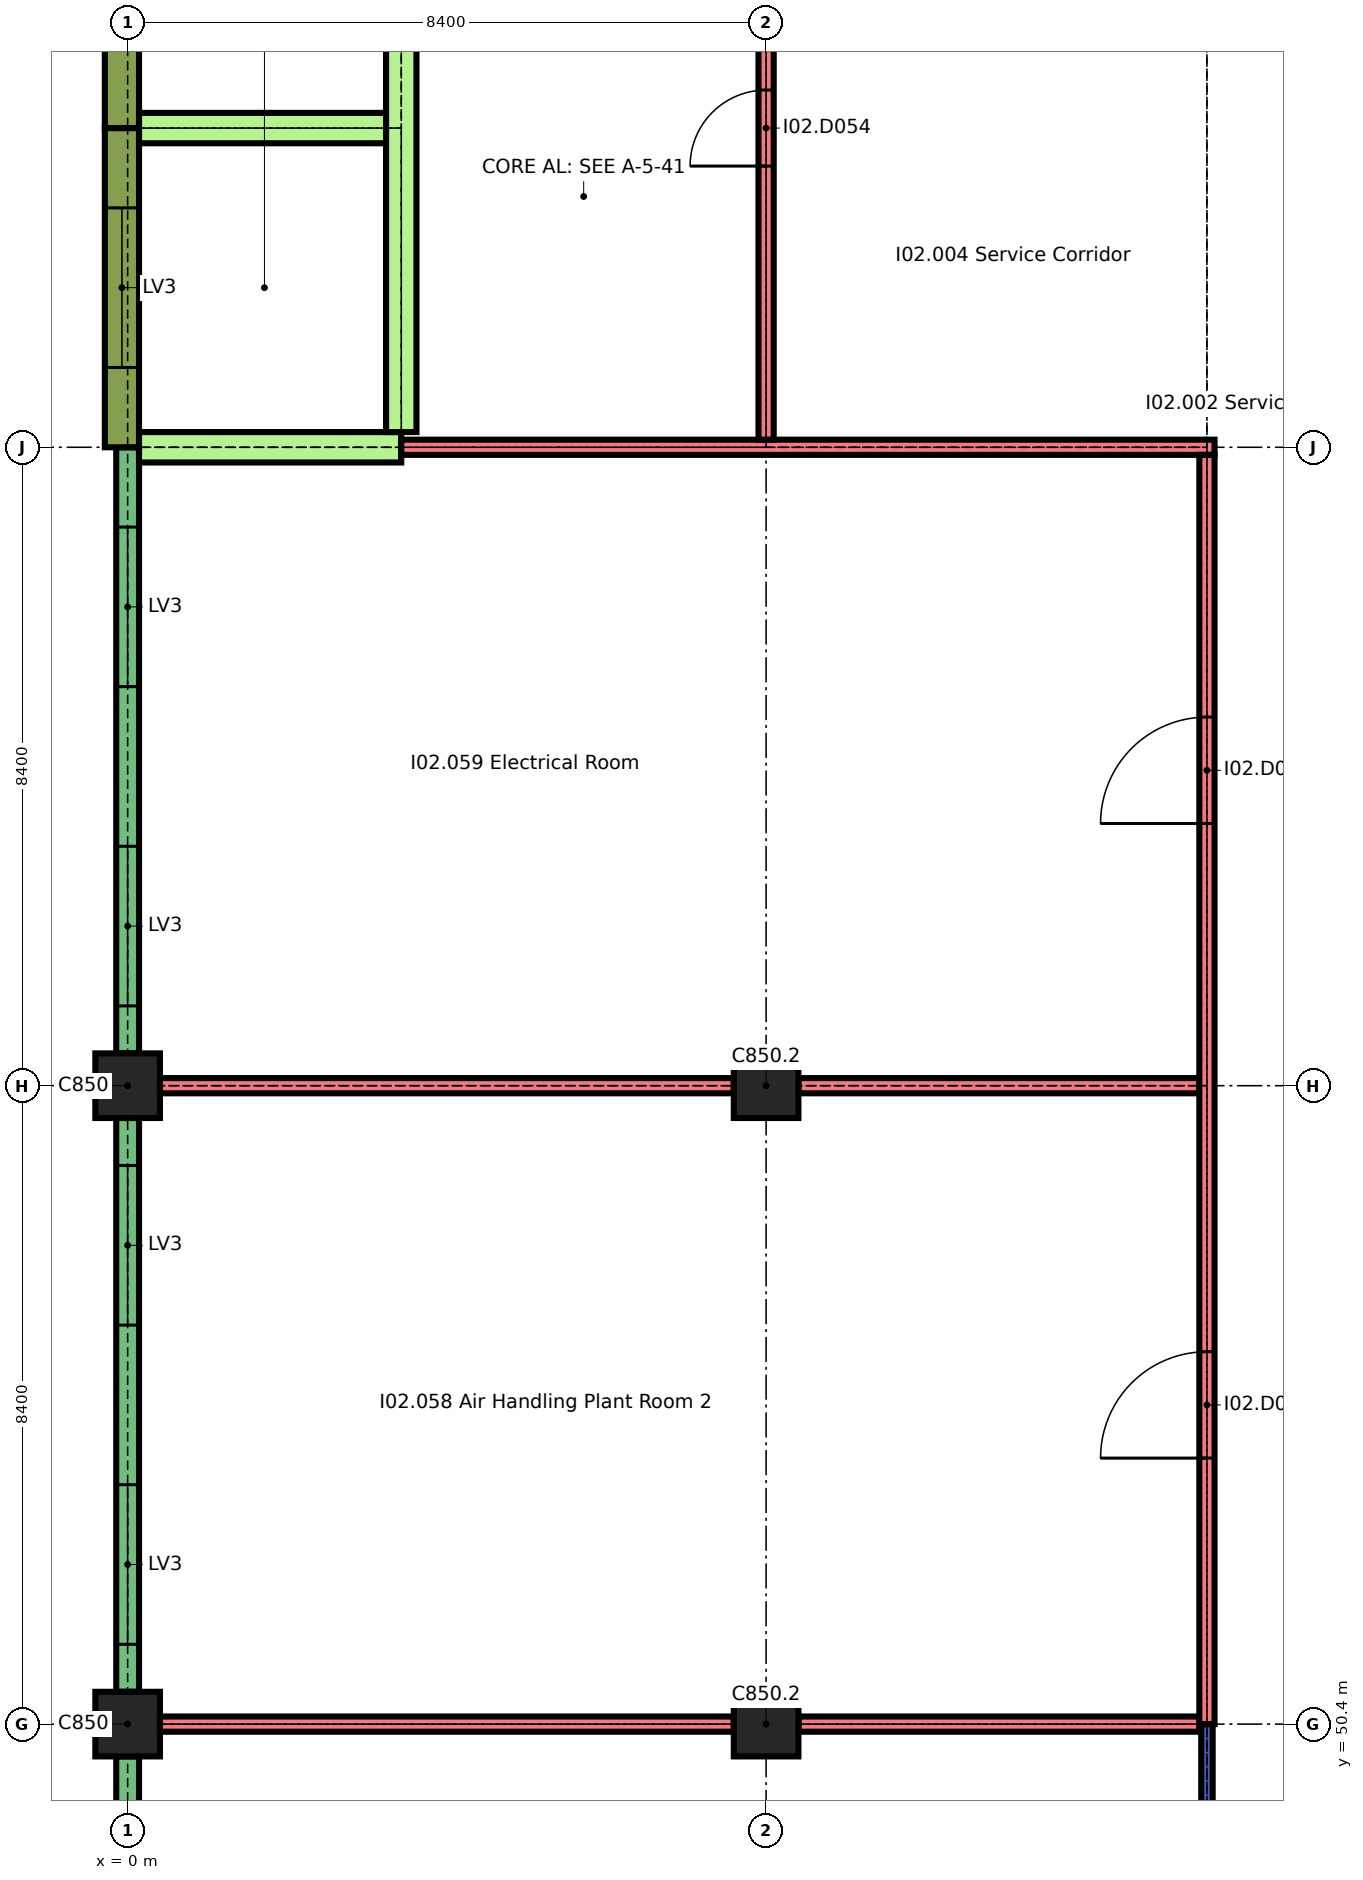
"""IFC4 building model, lengths in metres.
Left out: names, types, materials, properties, quantities, classifications, styles, units other than length and angle.
Written with IfcOpenShell. Run it as: python <this file> out.ifc"""

import sys

from ifc_helpers import new_model, si_unit, direction, frame, frame_2d, origin, origin_2d, place, context, subcontext, project, spatial, rectangle, extrude, element, fill, save


model = new_model("IFC4")
c1 = context("Model", 3, precision=1e-05, world=origin(), true_north=direction((0.0, 1.0)))
c2 = subcontext(c1, "Body", "Model", "MODEL_VIEW")
j1 = project(units=[si_unit("LENGTHUNIT", "METRE"), si_unit("PLANEANGLEUNIT", "RADIAN")], contexts=[c1])
p1 = place(None, origin())
s1 = spatial("IfcSite", under=j1, at=p1, CompositionType="ELEMENT")
p2 = place(p1, origin())
s2 = spatial("IfcBuilding", under=s1, at=p2, CompositionType="ELEMENT")
p3 = place(p2, frame((0.0, 0.0, 12.9)))
s3 = spatial("IfcBuildingStorey", under=s2, at=p3, CompositionType="ELEMENT", Elevation=12.9)
for number, where, z_axis, x_axis in (
    (1, (0.0, 50.4, 0.0), (0.0, 0.0, 1.0), (1.0, 0.0, 0.0)),
    (2, (8.4, 50.4, 0.0), (0.0, 0.0, 1.0), (1.0, 0.0, 0.0)),
    (3, (0.0, 58.8, 0.0), (0.0, 0.0, 1.0), (1.0, 0.0, 0.0)),
    (4, (8.4, 58.8, 0.0), (0.0, 0.0, 1.0), (1.0, 0.0, 0.0)),
):
    element("IfcColumn", number, at=place(p3, frame(where, z_axis=z_axis, x_axis=x_axis)), inside=s3, PredefinedType="COLUMN", context=c2, shape_type="SweptSolid", body=[
        extrude(rectangle(XDim=0.85, YDim=0.85, at=origin_2d()), origin(), (0.0, 0.0, 1.0), 2.04),
    ])
p4 = place(p3, frame((0.0, 42.425, 0.0), z_axis=(0.0, 0.0, 1.0), x_axis=(0.0, 1.0, 0.0)))
e5 = element("IfcWall", 5, at=p4, inside=s3, PredefinedType="SOLIDWALL", context=c2, shape_type="SweptSolid", body=[
    extrude(rectangle(XDim=7.55, YDim=0.3, at=frame_2d((3.775, 0.0))), origin(), (0.0, 0.0, 1.0), 1.74),
])
p5 = place(p4, frame((0.625, 0.0, 0.6)))
e6 = element("IfcOpeningElement", 6, at=p5, cuts=e5, PredefinedType="OPENING", context=c2, shape_type="SweptSolid", body=[
    extrude(rectangle(XDim=2.1, YDim=1.05, at=frame_2d((1.05, 0.525))), frame((0.0, 0.16, 0.0), z_axis=(0.0, -1.0, 0.0), x_axis=(1.0, 0.0, 0.0)), (0.0, 0.0, 1.0), 0.32),
])
p6 = place(p4, frame((4.825, 0.0, 0.6)))
e7 = element("IfcOpeningElement", 7, at=p6, cuts=e5, PredefinedType="OPENING", context=c2, shape_type="SweptSolid", body=[
    extrude(rectangle(XDim=2.1, YDim=1.05, at=frame_2d((1.05, 0.525))), frame((0.0, 0.16, 0.0), z_axis=(0.0, -1.0, 0.0), x_axis=(1.0, 0.0, 0.0)), (0.0, 0.0, 1.0), 0.32),
])
p7 = place(p3, frame((0.0, 50.825, 0.0), z_axis=(0.0, 0.0, 1.0), x_axis=(0.0, 1.0, 0.0)))
e8 = element("IfcWall", 8, at=p7, inside=s3, PredefinedType="SOLIDWALL", context=c2, shape_type="SweptSolid", body=[
    extrude(rectangle(XDim=7.55, YDim=0.3, at=frame_2d((3.775, 0.0))), origin(), (0.0, 0.0, 1.0), 1.74),
])
p8 = place(p7, frame((0.625, 0.0, 0.6)))
e9 = element("IfcOpeningElement", 9, at=p8, cuts=e8, PredefinedType="OPENING", context=c2, shape_type="SweptSolid", body=[
    extrude(rectangle(XDim=2.1, YDim=1.05, at=frame_2d((1.05, 0.525))), frame((0.0, 0.16, 0.0), z_axis=(0.0, -1.0, 0.0), x_axis=(1.0, 0.0, 0.0)), (0.0, 0.0, 1.0), 0.32),
])
p9 = place(p7, frame((4.825, 0.0, 0.6)))
e10 = element("IfcOpeningElement", 10, at=p9, cuts=e8, PredefinedType="OPENING", context=c2, shape_type="SweptSolid", body=[
    extrude(rectangle(XDim=2.1, YDim=1.05, at=frame_2d((1.05, 0.525))), frame((0.0, 0.16, 0.0), z_axis=(0.0, -1.0, 0.0), x_axis=(1.0, 0.0, 0.0)), (0.0, 0.0, 1.0), 0.32),
])
p10 = place(p3, frame((0.0, 59.225, 0.0), z_axis=(0.0, 0.0, 1.0), x_axis=(0.0, 1.0, 0.0)))
e11 = element("IfcWall", 11, at=p10, inside=s3, PredefinedType="SOLIDWALL", context=c2, shape_type="SweptSolid", body=[
    extrude(rectangle(XDim=7.975, YDim=0.3, at=frame_2d((3.987, 0.0))), origin(), (0.0, 0.0, 1.0), 1.74),
])
p11 = place(p10, frame((0.625, 0.0, 0.6)))
e12 = element("IfcOpeningElement", 12, at=p11, cuts=e11, PredefinedType="OPENING", context=c2, shape_type="SweptSolid", body=[
    extrude(rectangle(XDim=2.1, YDim=1.05, at=frame_2d((1.05, 0.525))), frame((0.0, 0.16, 0.0), z_axis=(0.0, -1.0, 0.0), x_axis=(1.0, 0.0, 0.0)), (0.0, 0.0, 1.0), 0.32),
])
p12 = place(p10, frame((4.825, 0.0, 0.6)))
e13 = element("IfcOpeningElement", 13, at=p12, cuts=e11, PredefinedType="OPENING", context=c2, shape_type="SweptSolid", body=[
    extrude(rectangle(XDim=2.1, YDim=1.05, at=frame_2d((1.05, 0.525))), frame((0.0, 0.16, 0.0), z_axis=(0.0, -1.0, 0.0), x_axis=(1.0, 0.0, 0.0)), (0.0, 0.0, 1.0), 0.32),
])
p13 = place(p3, frame((-0.075, 67.2, 0.0), z_axis=(0.0, 0.0, 1.0), x_axis=(0.0, 1.0, 0.0)))
e14 = element("IfcWall", 14, at=p13, inside=s3, PredefinedType="SOLIDWALL", context=c2, shape_type="SweptSolid", body=[
    extrude(rectangle(XDim=4.2, YDim=0.45, at=frame_2d((2.1, 0.0))), origin(), (0.0, 0.0, 1.0), 2.04),
])
p14 = place(p13, frame((1.05, 0.0, 0.6)))
e15 = element("IfcOpeningElement", 15, at=p14, cuts=e14, PredefinedType="OPENING", context=c2, shape_type="SweptSolid", body=[
    extrude(rectangle(XDim=2.1, YDim=1.05, at=frame_2d((1.05, 0.525))), frame((0.0, 0.235, 0.0), z_axis=(0.0, -1.0, 0.0), x_axis=(1.0, 0.0, 0.0)), (0.0, 0.0, 1.0), 0.47),
])
p15 = place(p3, frame((-0.075, 71.4, 0.0), z_axis=(0.0, 0.0, 1.0), x_axis=(0.0, 1.0, 0.0)))
e16 = element("IfcWall", 16, at=p15, inside=s3, PredefinedType="SOLIDWALL", context=c2, shape_type="SweptSolid", body=[
    extrude(rectangle(XDim=4.2, YDim=0.45, at=frame_2d((2.1, 0.0))), origin(), (0.0, 0.0, 1.0), 2.04),
])
p16 = place(p15, frame((1.05, 0.0, 0.6)))
e17 = element("IfcOpeningElement", 17, at=p16, cuts=e16, PredefinedType="OPENING", context=c2, shape_type="SweptSolid", body=[
    extrude(rectangle(XDim=2.1, YDim=1.05, at=frame_2d((1.05, 0.525))), frame((0.0, 0.235, 0.0), z_axis=(0.0, -1.0, 0.0), x_axis=(1.0, 0.0, 0.0)), (0.0, 0.0, 1.0), 0.47),
])
p17 = place(p3, frame((0.425, 50.4, 0.0), z_axis=(0.0, 0.0, 1.0), x_axis=(1.0, 0.0, 0.0)))
e18 = element("IfcWall", 18, at=p17, inside=s3, PredefinedType="SOLIDWALL", context=c2, shape_type="SweptSolid", body=[
    extrude(rectangle(XDim=7.55, YDim=0.2, at=frame_2d((3.775, 0.0))), origin(), (0.0, 0.0, 1.0), 2.04),
])
p18 = place(p3, frame((8.825, 50.4, 0.0), z_axis=(0.0, 0.0, 1.0), x_axis=(1.0, 0.0, 0.0)))
e19 = element("IfcWall", 19, at=p18, inside=s3, PredefinedType="SOLIDWALL", context=c2, shape_type="SweptSolid", body=[
    extrude(rectangle(XDim=5.275, YDim=0.2, at=frame_2d((2.638, 0.0))), origin(), (0.0, 0.0, 1.0), 2.04),
])
p19 = place(p3, frame((0.425, 58.8, 0.0), z_axis=(0.0, 0.0, 1.0), x_axis=(1.0, 0.0, 0.0)))
e20 = element("IfcWall", 20, at=p19, inside=s3, PredefinedType="SOLIDWALL", context=c2, shape_type="SweptSolid", body=[
    extrude(rectangle(XDim=7.55, YDim=0.2, at=frame_2d((3.775, 0.0))), origin(), (0.0, 0.0, 1.0), 2.04),
])
p20 = place(p3, frame((8.825, 58.8, 0.0), z_axis=(0.0, 0.0, 1.0), x_axis=(1.0, 0.0, 0.0)))
e21 = element("IfcWall", 21, at=p20, inside=s3, PredefinedType="SOLIDWALL", context=c2, shape_type="SweptSolid", body=[
    extrude(rectangle(XDim=5.275, YDim=0.2, at=frame_2d((2.638, 0.0))), origin(), (0.0, 0.0, 1.0), 2.04),
])
p21 = place(p3, frame((0.15, 67.2, 0.0), z_axis=(0.0, 0.0, 1.0), x_axis=(1.0, 0.0, 0.0)))
e22 = element("IfcWall", 22, at=p21, inside=s3, PredefinedType="SHEAR", context=c2, shape_type="SweptSolid", body=[
    extrude(rectangle(XDim=3.45, YDim=0.4, at=frame_2d((1.725, 0.0))), origin(), (0.0, 0.0, 1.0), 2.04),
])
p22 = place(p3, frame((3.6, 67.2, 0.0), z_axis=(0.0, 0.0, 1.0), x_axis=(1.0, 0.0, 0.0)))
e23 = element("IfcWall", 23, at=p22, inside=s3, PredefinedType="SOLIDWALL", context=c2, shape_type="SweptSolid", body=[
    extrude(rectangle(XDim=10.7, YDim=0.2, at=frame_2d((5.35, 0.0))), origin(), (0.0, 0.0, 1.0), 2.04),
])
p23 = place(p3, frame((0.15, 71.4, 0.0), z_axis=(0.0, 0.0, 1.0), x_axis=(1.0, 0.0, 0.0)))
e24 = element("IfcWall", 24, at=p23, inside=s3, PredefinedType="SHEAR", context=c2, shape_type="SweptSolid", body=[
    extrude(rectangle(XDim=3.25, YDim=0.4, at=frame_2d((1.625, 0.0))), origin(), (0.0, 0.0, 1.0), 2.04),
])
p24 = place(p3, frame((3.6, 67.4, 0.0), z_axis=(0.0, 0.0, 1.0), x_axis=(0.0, 1.0, 0.0)))
e25 = element("IfcWall", 25, at=p24, inside=s3, PredefinedType="SHEAR", context=c2, shape_type="SweptSolid", body=[
    extrude(rectangle(XDim=8.0, YDim=0.4, at=frame_2d((4.0, 0.0))), origin(), (0.0, 0.0, 1.0), 2.04),
])
p25 = place(p3, frame((8.4, 67.3, 0.0), z_axis=(0.0, 0.0, 1.0), x_axis=(0.0, 1.0, 0.0)))
e26 = element("IfcWall", 26, at=p25, inside=s3, PredefinedType="SOLIDWALL", context=c2, shape_type="SweptSolid", body=[
    extrude(rectangle(XDim=8.2, YDim=0.2, at=frame_2d((4.1, 0.0))), origin(), (0.0, 0.0, 1.0), 2.04),
])
p26 = place(p25, frame((3.6, 0.0, 0.0)))
e27 = element("IfcOpeningElement", 27, at=p26, cuts=e26, PredefinedType="OPENING", context=c2, shape_type="SweptSolid", body=[
    extrude(rectangle(XDim=1.0, YDim=2.0, at=frame_2d((0.5, 1.0))), frame((0.0, 0.11, 0.0), z_axis=(0.0, -1.0, 0.0), x_axis=(1.0, 0.0, 0.0)), (0.0, 0.0, 1.0), 0.22),
])
p27 = place(p3, frame((14.2, 33.6, 0.0), z_axis=(0.0, 0.0, 1.0), x_axis=(0.0, 1.0, 0.0)))
e28 = element("IfcWall", 28, at=p27, inside=s3, PredefinedType="PARTITIONING", context=c2, shape_type="SweptSolid", body=[
    extrude(rectangle(XDim=16.8, YDim=0.15, at=frame_2d((8.4, 0.0))), origin(), (0.0, 0.0, 1.0), 2.04),
])
p28 = place(p27, frame((7.7, 0.0, 0.0)))
e29 = element("IfcOpeningElement", 29, at=p28, cuts=e28, PredefinedType="OPENING", context=c2, shape_type="SweptSolid", body=[
    extrude(rectangle(XDim=1.4, YDim=2.0, at=frame_2d((0.7, 1.0))), frame((0.0, 0.085, 0.0), z_axis=(0.0, -1.0, 0.0), x_axis=(1.0, 0.0, 0.0)), (0.0, 0.0, 1.0), 0.17),
])
p29 = place(p3, frame((14.2, 50.4, 0.0), z_axis=(0.0, 0.0, 1.0), x_axis=(0.0, 1.0, 0.0)))
e30 = element("IfcWall", 30, at=p29, inside=s3, PredefinedType="SOLIDWALL", context=c2, shape_type="SweptSolid", body=[
    extrude(rectangle(XDim=16.7, YDim=0.2, at=frame_2d((8.35, 0.0))), origin(), (0.0, 0.0, 1.0), 2.04),
])
p30 = place(p29, frame((3.5, 0.0, 0.0)))
e31 = element("IfcOpeningElement", 31, at=p30, cuts=e30, PredefinedType="OPENING", context=c2, shape_type="SweptSolid", body=[
    extrude(rectangle(XDim=1.4, YDim=2.0, at=frame_2d((0.7, 1.0))), frame((0.0, 0.11, 0.0), z_axis=(0.0, -1.0, 0.0), x_axis=(1.0, 0.0, 0.0)), (0.0, 0.0, 1.0), 0.22),
])
p31 = place(p29, frame((11.85, 0.0, 0.0)))
e32 = element("IfcOpeningElement", 32, at=p31, cuts=e30, PredefinedType="OPENING", context=c2, shape_type="SweptSolid", body=[
    extrude(rectangle(XDim=1.4, YDim=2.0, at=frame_2d((0.7, 1.0))), frame((0.0, 0.11, 0.0), z_axis=(0.0, -1.0, 0.0), x_axis=(1.0, 0.0, 0.0)), (0.0, 0.0, 1.0), 0.22),
])
p32 = place(p8, origin())
e33 = element("IfcWindow", 33, at=p32, inside=s3, PartitioningType="SINGLE_PANEL", PredefinedType="WINDOW", context=c2, shape_type="SweptSolid", body=[
    extrude(rectangle(XDim=2.1, YDim=1.05, at=frame_2d((1.05, 0.525))), frame((0.0, 0.075, 0.0), z_axis=(0.0, -1.0, 0.0), x_axis=(1.0, 0.0, 0.0)), (0.0, 0.0, 1.0), 0.15),
])
fill(e9, e33)
p33 = place(p9, origin())
e34 = element("IfcWindow", 34, at=p33, inside=s3, PartitioningType="SINGLE_PANEL", PredefinedType="WINDOW", context=c2, shape_type="SweptSolid", body=[
    extrude(rectangle(XDim=2.1, YDim=1.05, at=frame_2d((1.05, 0.525))), frame((0.0, 0.075, 0.0), z_axis=(0.0, -1.0, 0.0), x_axis=(1.0, 0.0, 0.0)), (0.0, 0.0, 1.0), 0.15),
])
fill(e10, e34)
p34 = place(p11, origin())
e35 = element("IfcWindow", 35, at=p34, inside=s3, PartitioningType="SINGLE_PANEL", PredefinedType="WINDOW", context=c2, shape_type="SweptSolid", body=[
    extrude(rectangle(XDim=2.1, YDim=1.05, at=frame_2d((1.05, 0.525))), frame((0.0, 0.075, 0.0), z_axis=(0.0, -1.0, 0.0), x_axis=(1.0, 0.0, 0.0)), (0.0, 0.0, 1.0), 0.15),
])
fill(e12, e35)
p35 = place(p12, origin())
e36 = element("IfcWindow", 36, at=p35, inside=s3, PartitioningType="SINGLE_PANEL", PredefinedType="WINDOW", context=c2, shape_type="SweptSolid", body=[
    extrude(rectangle(XDim=2.1, YDim=1.05, at=frame_2d((1.05, 0.525))), frame((0.0, 0.075, 0.0), z_axis=(0.0, -1.0, 0.0), x_axis=(1.0, 0.0, 0.0)), (0.0, 0.0, 1.0), 0.15),
])
fill(e13, e36)
p36 = place(p14, origin())
e37 = element("IfcWindow", 37, at=p36, inside=s3, PartitioningType="SINGLE_PANEL", PredefinedType="WINDOW", context=c2, shape_type="SweptSolid", body=[
    extrude(rectangle(XDim=2.1, YDim=1.05, at=frame_2d((1.05, 0.525))), frame((0.0, 0.075, 0.0), z_axis=(0.0, -1.0, 0.0), x_axis=(1.0, 0.0, 0.0)), (0.0, 0.0, 1.0), 0.15),
])
fill(e15, e37)
p37 = place(p26, origin())
e38 = element("IfcDoor", 38, at=p37, inside=s3, OperationType="SINGLE_SWING_RIGHT", PredefinedType="DOOR", context=c2, shape_type="SweptSolid", body=[
    extrude(rectangle(XDim=1.0, YDim=2.0, at=frame_2d((0.5, 1.0))), frame((0.0, 0.025, 0.0), z_axis=(0.0, -1.0, 0.0), x_axis=(1.0, 0.0, 0.0)), (0.0, 0.0, 1.0), 0.05),
])
fill(e27, e38)
p38 = place(p30, origin())
e39 = element("IfcDoor", 39, at=p38, inside=s3, OperationType="SINGLE_SWING_RIGHT", PredefinedType="DOOR", context=c2, shape_type="SweptSolid", body=[
    extrude(rectangle(XDim=1.4, YDim=2.0, at=frame_2d((0.7, 1.0))), frame((0.0, 0.025, 0.0), z_axis=(0.0, -1.0, 0.0), x_axis=(1.0, 0.0, 0.0)), (0.0, 0.0, 1.0), 0.05),
])
fill(e31, e39)
p39 = place(p31, origin())
e40 = element("IfcDoor", 40, at=p39, inside=s3, OperationType="SINGLE_SWING_RIGHT", PredefinedType="DOOR", context=c2, shape_type="SweptSolid", body=[
    extrude(rectangle(XDim=1.4, YDim=2.0, at=frame_2d((0.7, 1.0))), frame((0.0, 0.025, 0.0), z_axis=(0.0, -1.0, 0.0), x_axis=(1.0, 0.0, 0.0)), (0.0, 0.0, 1.0), 0.05),
])
fill(e32, e40)
save(model, sys.argv[1])
